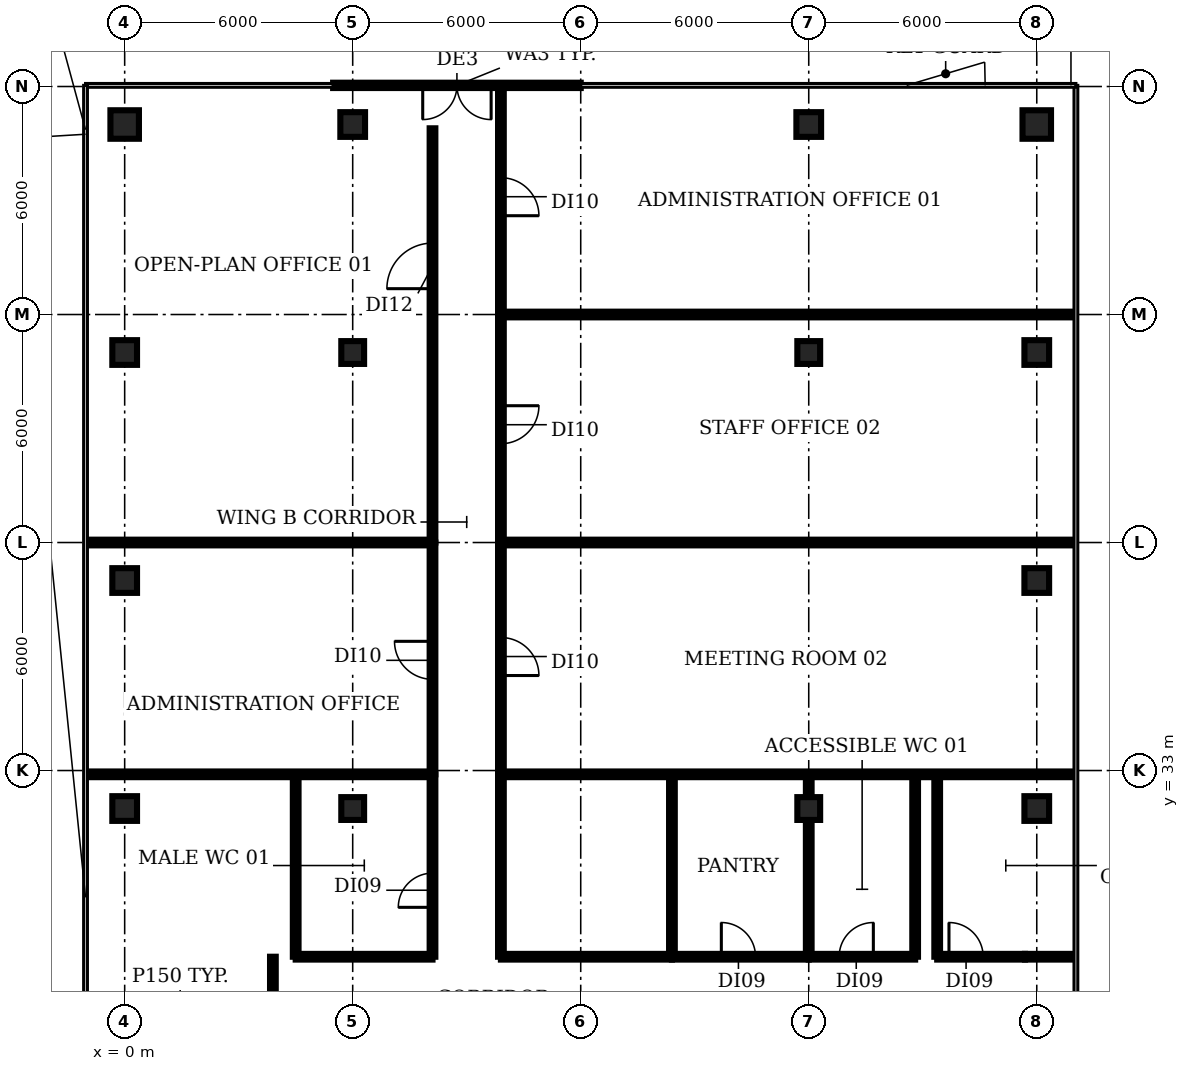
"""IFC4 building model, lengths in metres.
Left out: names, types, materials, properties, quantities, classifications, styles, units other than length and angle.
Written with IfcOpenShell. Run it as: python <this file> out.ifc"""

import sys

from ifc_helpers import new_model, si_unit, direction, frame, frame_2d, origin, origin_2d, place, context, subcontext, project, spatial, rectangle, circle, extrude, element, fill, save


model = new_model("IFC4")
c1 = context("Model", 3, precision=1e-05, world=origin(), true_north=direction((0.0, 1.0)))
c2 = subcontext(c1, "Body", "Model", "MODEL_VIEW")
j1 = project(units=[si_unit("LENGTHUNIT", "METRE"), si_unit("PLANEANGLEUNIT", "RADIAN")], contexts=[c1])
p1 = place(None, origin())
s1 = spatial("IfcSite", under=j1, at=p1, CompositionType="ELEMENT")
p2 = place(p1, origin())
s2 = spatial("IfcBuilding", under=s1, at=p2, CompositionType="ELEMENT")
p3 = place(p2, frame((0.0, 0.0, 314.6)))
s3 = spatial("IfcBuildingStorey", under=s2, at=p3, CompositionType="ELEMENT", Elevation=314.6)
for number, where, z_axis, x_axis in (
    (1, (0.0, 32.0, 0.0), (0.0, 0.0, 1.0), (1.0, 0.0, 0.0)),
    (2, (0.0, 38.0, 0.0), (0.0, 0.0, 1.0), (1.0, 0.0, 0.0)),
    (3, (0.0, 44.0, 0.0), (0.0, 0.0, 1.0), (1.0, 0.0, 0.0)),
):
    element("IfcColumn", number, at=place(p3, frame(where, z_axis=z_axis, x_axis=x_axis)), inside=s3, PredefinedType="COLUMN", context=c2, shape_type="SweptSolid", body=[
        extrude(rectangle(XDim=0.65, YDim=0.65, at=origin_2d()), origin(), (0.0, 0.0, 1.0), 3.9),
    ])
p4 = place(p3, frame((0.0, 50.0, 0.0), z_axis=(0.0, 0.0, 1.0), x_axis=(1.0, 0.0, 0.0)))
e4 = element("IfcColumn", 4, at=p4, inside=s3, PredefinedType="COLUMN", context=c2, shape_type="SweptSolid", body=[
    extrude(circle(Radius=0.375, at=origin_2d()), origin(), (0.0, 0.0, 1.0), 3.9),
])
for number, where, z_axis, x_axis in (
    (5, (6.0, 32.0, 0.0), (0.0, 0.0, 1.0), (1.0, 0.0, 0.0)),
    (6, (6.0, 44.0, 0.0), (0.0, 0.0, 1.0), (1.0, 0.0, 0.0)),
):
    element("IfcColumn", number, at=place(p3, frame(where, z_axis=z_axis, x_axis=x_axis)), inside=s3, PredefinedType="COLUMN", context=c2, shape_type="SweptSolid", body=[
        extrude(rectangle(XDim=0.6, YDim=0.6, at=origin_2d()), origin(), (0.0, 0.0, 1.0), 3.9),
    ])
p5 = place(p3, frame((6.0, 50.0, 0.0), z_axis=(0.0, 0.0, 1.0), x_axis=(1.0, 0.0, 0.0)))
e7 = element("IfcColumn", 7, at=p5, inside=s3, PredefinedType="COLUMN", context=c2, shape_type="SweptSolid", body=[
    extrude(rectangle(XDim=0.65, YDim=0.65, at=origin_2d()), origin(), (0.0, 0.0, 1.0), 3.9),
])
for number, where, z_axis, x_axis in (
    (8, (18.0, 32.0, 0.0), (0.0, 0.0, 1.0), (1.0, 0.0, 0.0)),
    (9, (18.0, 44.0, 0.0), (0.0, 0.0, 1.0), (1.0, 0.0, 0.0)),
):
    element("IfcColumn", number, at=place(p3, frame(where, z_axis=z_axis, x_axis=x_axis)), inside=s3, PredefinedType="COLUMN", context=c2, shape_type="SweptSolid", body=[
        extrude(rectangle(XDim=0.6, YDim=0.6, at=origin_2d()), origin(), (0.0, 0.0, 1.0), 3.9),
    ])
for number, where, z_axis, x_axis in (
    (10, (18.0, 50.0, 0.0), (0.0, 0.0, 1.0), (1.0, 0.0, 0.0)),
    (11, (24.0, 32.0, 0.0), (0.0, 0.0, 1.0), (1.0, 0.0, 0.0)),
    (12, (24.0, 38.0, 0.0), (0.0, 0.0, 1.0), (1.0, 0.0, 0.0)),
    (13, (24.0, 44.0, 0.0), (0.0, 0.0, 1.0), (1.0, 0.0, 0.0)),
):
    element("IfcColumn", number, at=place(p3, frame(where, z_axis=z_axis, x_axis=x_axis)), inside=s3, PredefinedType="COLUMN", context=c2, shape_type="SweptSolid", body=[
        extrude(rectangle(XDim=0.65, YDim=0.65, at=origin_2d()), origin(), (0.0, 0.0, 1.0), 3.9),
    ])
p6 = place(p3, frame((24.0, 50.0, 0.0), z_axis=(0.0, 0.0, 1.0), x_axis=(1.0, 0.0, 0.0)))
e14 = element("IfcColumn", 14, at=p6, inside=s3, PredefinedType="COLUMN", context=c2, shape_type="SweptSolid", body=[
    extrude(circle(Radius=0.375, at=origin_2d()), origin(), (0.0, 0.0, 1.0), 3.9),
])
p7 = place(p3, frame((12.0, 51.03, 0.0), z_axis=(0.0, 0.0, 1.0), x_axis=(-1.0, 0.0, 0.0)))
e15 = element("IfcWall", 15, at=p7, inside=s3, PredefinedType="SOLIDWALL", context=c2, shape_type="SweptSolid", body=[
    extrude(rectangle(XDim=6.515, YDim=0.14, at=frame_2d((3.257, 0.0))), origin(), (0.0, 0.0, 1.0), 3.9),
])
p8 = place(p7, frame((2.357, 0.0, 0.0)))
e16 = element("IfcOpeningElement", 16, at=p8, cuts=e15, PredefinedType="OPENING", context=c2, shape_type="SweptSolid", body=[
    extrude(rectangle(XDim=1.8, YDim=2.4, at=frame_2d((0.9, 1.2))), frame((0.0, 0.08, 0.0), z_axis=(0.0, -1.0, 0.0), x_axis=(1.0, 0.0, 0.0)), (0.0, 0.0, 1.0), 0.16),
])
for number, where, z_axis, x_axis in (
    (17, (-0.98, 32.9, 0.0), (0.0, 0.0, 1.0), (1.0, 0.0, 0.0)),
    (18, (-0.98, 39.0, 0.0), (0.0, 0.0, 1.0), (1.0, 0.0, 0.0)),
):
    element("IfcWall", number, at=place(p3, frame(where, z_axis=z_axis, x_axis=x_axis)), inside=s3, PredefinedType="PARTITIONING", context=c2, shape_type="SweptSolid", body=[
        extrude(rectangle(XDim=9.08, YDim=0.15, at=frame_2d((4.54, 0.0))), origin(), (0.0, 0.0, 1.0), 2.95),
    ])
p9 = place(p3, frame((3.9, 22.5, 0.0), z_axis=(0.0, 0.0, 1.0), x_axis=(0.0, 1.0, 0.0)))
e19 = element("IfcWall", 19, at=p9, inside=s3, PredefinedType="PARTITIONING", context=c2, shape_type="SweptSolid", body=[
    extrude(rectangle(XDim=5.6, YDim=0.15, at=frame_2d((2.8, 0.0))), origin(), (0.0, 0.0, 1.0), 2.95),
])
p10 = place(p3, frame((4.5, 28.1, 0.0), z_axis=(0.0, 0.0, 1.0), x_axis=(0.0, 1.0, 0.0)))
e20 = element("IfcWall", 20, at=p10, inside=s3, PredefinedType="PARTITIONING", context=c2, shape_type="SweptSolid", body=[
    extrude(rectangle(XDim=4.8, YDim=0.15, at=frame_2d((2.4, 0.0))), origin(), (0.0, 0.0, 1.0), 2.95),
])
p11 = place(p3, frame((4.5, 28.1, 0.0), z_axis=(0.0, 0.0, 1.0), x_axis=(1.0, 0.0, 0.0)))
e21 = element("IfcWall", 21, at=p11, inside=s3, PredefinedType="PARTITIONING", context=c2, shape_type="SweptSolid", body=[
    extrude(rectangle(XDim=3.6, YDim=0.15, at=frame_2d((1.8, 0.0))), origin(), (0.0, 0.0, 1.0), 2.95),
])
p12 = place(p3, frame((8.1, 28.1, 0.0), z_axis=(0.0, 0.0, 1.0), x_axis=(0.0, 1.0, 0.0)))
e22 = element("IfcWall", 22, at=p12, inside=s3, PredefinedType="PARTITIONING", context=c2, shape_type="SweptSolid", body=[
    extrude(rectangle(XDim=4.8, YDim=0.15, at=frame_2d((2.4, 0.0))), origin(), (0.0, 0.0, 1.0), 2.95),
])
p13 = place(p12, frame((1.3, 0.0, 0.0)))
e23 = element("IfcOpeningElement", 23, at=p13, cuts=e22, PredefinedType="OPENING", context=c2, shape_type="SweptSolid", body=[
    extrude(rectangle(XDim=0.9, YDim=2.1, at=frame_2d((0.45, 1.05))), frame((0.0, 0.085, 0.0), z_axis=(0.0, -1.0, 0.0), x_axis=(1.0, 0.0, 0.0)), (0.0, 0.0, 1.0), 0.17),
])
p14 = place(p3, frame((8.1, 32.9, 0.0), z_axis=(0.0, 0.0, 1.0), x_axis=(0.0, 1.0, 0.0)))
e24 = element("IfcWall", 24, at=p14, inside=s3, PredefinedType="PARTITIONING", context=c2, shape_type="SweptSolid", body=[
    extrude(rectangle(XDim=6.1, YDim=0.15, at=frame_2d((3.05, 0.0))), origin(), (0.0, 0.0, 1.0), 2.95),
])
p15 = place(p14, frame((2.5, 0.0, 0.0)))
e25 = element("IfcOpeningElement", 25, at=p15, cuts=e24, PredefinedType="OPENING", context=c2, shape_type="SweptSolid", body=[
    extrude(rectangle(XDim=1.0, YDim=2.1, at=frame_2d((0.5, 1.05))), frame((0.0, 0.085, 0.0), z_axis=(0.0, -1.0, 0.0), x_axis=(1.0, 0.0, 0.0)), (0.0, 0.0, 1.0), 0.17),
])
p16 = place(p3, frame((8.1, 39.0, 0.0), z_axis=(0.0, 0.0, 1.0), x_axis=(0.0, 1.0, 0.0)))
e26 = element("IfcWall", 26, at=p16, inside=s3, PredefinedType="PARTITIONING", context=c2, shape_type="SweptSolid", body=[
    extrude(rectangle(XDim=10.9, YDim=0.15, at=frame_2d((5.45, 0.0))), origin(), (0.0, 0.0, 1.0), 2.95),
])
p17 = place(p16, frame((6.68, 0.0, 0.0)))
e27 = element("IfcOpeningElement", 27, at=p17, cuts=e26, PredefinedType="OPENING", context=c2, shape_type="SweptSolid", body=[
    extrude(rectangle(XDim=1.2, YDim=2.1, at=frame_2d((0.6, 1.05))), frame((0.0, 0.085, 0.0), z_axis=(0.0, -1.0, 0.0), x_axis=(1.0, 0.0, 0.0)), (0.0, 0.0, 1.0), 0.17),
])
p18 = place(p3, frame((9.9, 28.1, 0.0), z_axis=(0.0, 0.0, 1.0), x_axis=(0.0, 1.0, 0.0)))
e28 = element("IfcWall", 28, at=p18, inside=s3, PredefinedType="PARTITIONING", context=c2, shape_type="SweptSolid", body=[
    extrude(rectangle(XDim=4.8, YDim=0.15, at=frame_2d((2.4, 0.0))), origin(), (0.0, 0.0, 1.0), 2.95),
])
p19 = place(p3, frame((9.9, 28.1, 0.0), z_axis=(0.0, 0.0, 1.0), x_axis=(1.0, 0.0, 0.0)))
e29 = element("IfcWall", 29, at=p19, inside=s3, PredefinedType="PARTITIONING", context=c2, shape_type="SweptSolid", body=[
    extrude(rectangle(XDim=4.5, YDim=0.15, at=frame_2d((2.25, 0.0))), origin(), (0.0, 0.0, 1.0), 2.95),
])
p20 = place(p3, frame((9.9, 32.9, 0.0), z_axis=(0.0, 0.0, 1.0), x_axis=(1.0, 0.0, 0.0)))
e30 = element("IfcWall", 30, at=p20, inside=s3, PredefinedType="PARTITIONING", context=c2, shape_type="SweptSolid", body=[
    extrude(rectangle(XDim=15.08, YDim=0.15, at=frame_2d((7.54, 0.0))), origin(), (0.0, 0.0, 1.0), 2.95),
])
p21 = place(p3, frame((9.9, 39.0, 0.0), z_axis=(0.0, 0.0, 1.0), x_axis=(0.0, -1.0, 0.0)))
e31 = element("IfcWall", 31, at=p21, inside=s3, PredefinedType="PARTITIONING", context=c2, shape_type="SweptSolid", body=[
    extrude(rectangle(XDim=6.1, YDim=0.15, at=frame_2d((3.05, 0.0))), origin(), (0.0, 0.0, 1.0), 2.95),
])
p22 = place(p21, frame((2.5, 0.0, 0.0)))
e32 = element("IfcOpeningElement", 32, at=p22, cuts=e31, PredefinedType="OPENING", context=c2, shape_type="SweptSolid", body=[
    extrude(rectangle(XDim=1.0, YDim=2.1, at=frame_2d((0.5, 1.05))), frame((0.0, 0.085, 0.0), z_axis=(0.0, -1.0, 0.0), x_axis=(1.0, 0.0, 0.0)), (0.0, 0.0, 1.0), 0.17),
])
p23 = place(p3, frame((9.9, 39.0, 0.0), z_axis=(0.0, 0.0, 1.0), x_axis=(1.0, 0.0, 0.0)))
e33 = element("IfcWall", 33, at=p23, inside=s3, PredefinedType="PARTITIONING", context=c2, shape_type="SweptSolid", body=[
    extrude(rectangle(XDim=15.08, YDim=0.15, at=frame_2d((7.54, 0.0))), origin(), (0.0, 0.0, 1.0), 2.95),
])
p24 = place(p3, frame((9.9, 45.0, 0.0), z_axis=(0.0, 0.0, 1.0), x_axis=(0.0, -1.0, 0.0)))
e34 = element("IfcWall", 34, at=p24, inside=s3, PredefinedType="PARTITIONING", context=c2, shape_type="SweptSolid", body=[
    extrude(rectangle(XDim=6.0, YDim=0.15, at=frame_2d((3.0, 0.0))), origin(), (0.0, 0.0, 1.0), 2.95),
])
p25 = place(p24, frame((2.4, 0.0, 0.0)))
e35 = element("IfcOpeningElement", 35, at=p25, cuts=e34, PredefinedType="OPENING", context=c2, shape_type="SweptSolid", body=[
    extrude(rectangle(XDim=1.0, YDim=2.1, at=frame_2d((0.5, 1.05))), frame((0.0, 0.085, 0.0), z_axis=(0.0, -1.0, 0.0), x_axis=(1.0, 0.0, 0.0)), (0.0, 0.0, 1.0), 0.17),
])
p26 = place(p3, frame((9.9, 45.0, 0.0), z_axis=(0.0, 0.0, 1.0), x_axis=(1.0, 0.0, 0.0)))
e36 = element("IfcWall", 36, at=p26, inside=s3, PredefinedType="PARTITIONING", context=c2, shape_type="SweptSolid", body=[
    extrude(rectangle(XDim=15.075, YDim=0.15, at=frame_2d((7.538, 0.0))), origin(), (0.0, 0.0, 1.0), 2.95),
])
p27 = place(p3, frame((9.9, 50.98, 0.0), z_axis=(0.0, 0.0, 1.0), x_axis=(0.0, -1.0, 0.0)))
e37 = element("IfcWall", 37, at=p27, inside=s3, PredefinedType="PARTITIONING", context=c2, shape_type="SweptSolid", body=[
    extrude(rectangle(XDim=5.98, YDim=0.15, at=frame_2d((2.99, 0.0))), origin(), (0.0, 0.0, 1.0), 2.95),
])
p28 = place(p27, frame((2.38, 0.0, 0.0)))
e38 = element("IfcOpeningElement", 38, at=p28, cuts=e37, PredefinedType="OPENING", context=c2, shape_type="SweptSolid", body=[
    extrude(rectangle(XDim=1.0, YDim=2.1, at=frame_2d((0.5, 1.05))), frame((0.0, 0.085, 0.0), z_axis=(0.0, -1.0, 0.0), x_axis=(1.0, 0.0, 0.0)), (0.0, 0.0, 1.0), 0.17),
])
p29 = place(p3, frame((14.4, 28.1, 0.0), z_axis=(0.0, 0.0, 1.0), x_axis=(0.0, 1.0, 0.0)))
e39 = element("IfcWall", 39, at=p29, inside=s3, PredefinedType="PARTITIONING", context=c2, shape_type="SweptSolid", body=[
    extrude(rectangle(XDim=4.8, YDim=0.15, at=frame_2d((2.4, 0.0))), origin(), (0.0, 0.0, 1.0), 2.95),
])
p30 = place(p3, frame((14.4, 28.1, 0.0), z_axis=(0.0, 0.0, 1.0), x_axis=(1.0, 0.0, 0.0)))
e40 = element("IfcWall", 40, at=p30, inside=s3, PredefinedType="PARTITIONING", context=c2, shape_type="SweptSolid", body=[
    extrude(rectangle(XDim=3.6, YDim=0.15, at=frame_2d((1.8, 0.0))), origin(), (0.0, 0.0, 1.0), 2.95),
])
p31 = place(p30, frame((1.3, 0.0, 0.0)))
e41 = element("IfcOpeningElement", 41, at=p31, cuts=e40, PredefinedType="OPENING", context=c2, shape_type="SweptSolid", body=[
    extrude(rectangle(XDim=0.9, YDim=2.1, at=frame_2d((0.45, 1.05))), frame((0.0, 0.085, 0.0), z_axis=(0.0, -1.0, 0.0), x_axis=(1.0, 0.0, 0.0)), (0.0, 0.0, 1.0), 0.17),
])
p32 = place(p3, frame((18.0, 28.1, 0.0), z_axis=(0.0, 0.0, 1.0), x_axis=(0.0, 1.0, 0.0)))
e42 = element("IfcWall", 42, at=p32, inside=s3, PredefinedType="PARTITIONING", context=c2, shape_type="SweptSolid", body=[
    extrude(rectangle(XDim=3.53, YDim=0.15, at=frame_2d((1.765, 0.0))), origin(), (0.0, 0.0, 1.0), 2.95),
])
p33 = place(p3, frame((18.0, 28.1, 0.0), z_axis=(0.0, 0.0, 1.0), x_axis=(1.0, 0.0, 0.0)))
e43 = element("IfcWall", 43, at=p33, inside=s3, PredefinedType="PARTITIONING", context=c2, shape_type="SweptSolid", body=[
    extrude(rectangle(XDim=2.8, YDim=0.15, at=frame_2d((1.4, 0.0))), origin(), (0.0, 0.0, 1.0), 2.95),
])
p34 = place(p33, frame((0.8, 0.0, 0.0)))
e44 = element("IfcOpeningElement", 44, at=p34, cuts=e43, PredefinedType="OPENING", context=c2, shape_type="SweptSolid", body=[
    extrude(rectangle(XDim=0.9, YDim=2.1, at=frame_2d((0.45, 1.05))), frame((0.0, 0.085, 0.0), z_axis=(0.0, -1.0, 0.0), x_axis=(1.0, 0.0, 0.0)), (0.0, 0.0, 1.0), 0.17),
])
p35 = place(p3, frame((18.0, 31.736, 0.0), z_axis=(0.0, 0.0, 1.0), x_axis=(0.0, 1.0, 0.0)))
e45 = element("IfcWall", 45, at=p35, inside=s3, PredefinedType="PARTITIONING", context=c2, shape_type="SweptSolid", body=[
    extrude(rectangle(XDim=0.529, YDim=0.15, at=frame_2d((0.264, 0.0))), origin(), (0.0, 0.0, 1.0), 2.95),
])
p36 = place(p3, frame((18.0, 32.37, 0.0), z_axis=(0.0, 0.0, 1.0), x_axis=(0.0, 1.0, 0.0)))
e46 = element("IfcWall", 46, at=p36, inside=s3, PredefinedType="PARTITIONING", context=c2, shape_type="SweptSolid", body=[
    extrude(rectangle(XDim=0.53, YDim=0.15, at=frame_2d((0.265, 0.0))), origin(), (0.0, 0.0, 1.0), 2.95),
])
for number, where, z_axis, x_axis in (
    (47, (20.8, 28.1, 0.0), (0.0, 0.0, 1.0), (0.0, 1.0, 0.0)),
    (48, (21.38, 28.1, 0.0), (0.0, 0.0, 1.0), (0.0, 1.0, 0.0)),
):
    element("IfcWall", number, at=place(p3, frame(where, z_axis=z_axis, x_axis=x_axis)), inside=s3, PredefinedType="PARTITIONING", context=c2, shape_type="SweptSolid", body=[
        extrude(rectangle(XDim=4.8, YDim=0.15, at=frame_2d((2.4, 0.0))), origin(), (0.0, 0.0, 1.0), 2.95),
    ])
p37 = place(p3, frame((21.38, 28.1, 0.0), z_axis=(0.0, 0.0, 1.0), x_axis=(1.0, 0.0, 0.0)))
e49 = element("IfcWall", 49, at=p37, inside=s3, PredefinedType="PARTITIONING", context=c2, shape_type="SweptSolid", body=[
    extrude(rectangle(XDim=2.31, YDim=0.15, at=frame_2d((1.155, 0.0))), origin(), (0.0, 0.0, 1.0), 2.95),
])
p38 = place(p37, frame((0.31, 0.0, 0.0)))
e50 = element("IfcOpeningElement", 50, at=p38, cuts=e49, PredefinedType="OPENING", context=c2, shape_type="SweptSolid", body=[
    extrude(rectangle(XDim=0.9, YDim=2.1, at=frame_2d((0.45, 1.05))), frame((0.0, 0.085, 0.0), z_axis=(0.0, -1.0, 0.0), x_axis=(1.0, 0.0, 0.0)), (0.0, 0.0, 1.0), 0.17),
])
p39 = place(p3, frame((23.69, 28.1, 0.0), z_axis=(0.0, 0.0, 1.0), x_axis=(1.0, 0.0, 0.0)))
e51 = element("IfcWall", 51, at=p39, inside=s3, PredefinedType="PARTITIONING", context=c2, shape_type="SweptSolid", body=[
    extrude(rectangle(XDim=1.29, YDim=0.15, at=frame_2d((0.645, 0.0))), origin(), (0.0, 0.0, 1.0), 2.95),
])
p40 = place(p8, origin())
e52 = element("IfcDoor", 52, at=p40, inside=s3, OperationType="DOUBLE_DOOR_DOUBLE_SWING", PredefinedType="DOOR", context=c2, shape_type="SweptSolid", body=[
    extrude(rectangle(XDim=1.8, YDim=2.4, at=frame_2d((0.9, 1.2))), frame((0.0, 0.025, 0.0), z_axis=(0.0, -1.0, 0.0), x_axis=(1.0, 0.0, 0.0)), (0.0, 0.0, 1.0), 0.05),
])
fill(e16, e52)
p41 = place(p13, origin())
e53 = element("IfcDoor", 53, at=p41, inside=s3, OperationType="SINGLE_SWING_LEFT", PredefinedType="DOOR", context=c2, shape_type="SweptSolid", body=[
    extrude(rectangle(XDim=0.9, YDim=2.1, at=frame_2d((0.45, 1.05))), frame((0.0, 0.025, 0.0), z_axis=(0.0, -1.0, 0.0), x_axis=(1.0, 0.0, 0.0)), (0.0, 0.0, 1.0), 0.05),
])
fill(e23, e53)
p42 = place(p15, origin())
e54 = element("IfcDoor", 54, at=p42, inside=s3, OperationType="SINGLE_SWING_RIGHT", PredefinedType="DOOR", context=c2, shape_type="SweptSolid", body=[
    extrude(rectangle(XDim=1.0, YDim=2.1, at=frame_2d((0.5, 1.05))), frame((0.0, 0.025, 0.0), z_axis=(0.0, -1.0, 0.0), x_axis=(1.0, 0.0, 0.0)), (0.0, 0.0, 1.0), 0.05),
])
fill(e25, e54)
p43 = place(p17, origin())
e55 = element("IfcDoor", 55, at=p43, inside=s3, OperationType="SINGLE_SWING_LEFT", PredefinedType="DOOR", context=c2, shape_type="SweptSolid", body=[
    extrude(rectangle(XDim=1.2, YDim=2.1, at=frame_2d((0.6, 1.05))), frame((0.0, 0.025, 0.0), z_axis=(0.0, -1.0, 0.0), x_axis=(1.0, 0.0, 0.0)), (0.0, 0.0, 1.0), 0.05),
])
fill(e27, e55)
p44 = place(p22, origin())
e56 = element("IfcDoor", 56, at=p44, inside=s3, OperationType="SINGLE_SWING_RIGHT", PredefinedType="DOOR", context=c2, shape_type="SweptSolid", body=[
    extrude(rectangle(XDim=1.0, YDim=2.1, at=frame_2d((0.5, 1.05))), frame((0.0, 0.025, 0.0), z_axis=(0.0, -1.0, 0.0), x_axis=(1.0, 0.0, 0.0)), (0.0, 0.0, 1.0), 0.05),
])
fill(e32, e56)
p45 = place(p25, origin())
e57 = element("IfcDoor", 57, at=p45, inside=s3, OperationType="SINGLE_SWING_LEFT", PredefinedType="DOOR", context=c2, shape_type="SweptSolid", body=[
    extrude(rectangle(XDim=1.0, YDim=2.1, at=frame_2d((0.5, 1.05))), frame((0.0, 0.025, 0.0), z_axis=(0.0, -1.0, 0.0), x_axis=(1.0, 0.0, 0.0)), (0.0, 0.0, 1.0), 0.05),
])
fill(e35, e57)
p46 = place(p28, origin())
e58 = element("IfcDoor", 58, at=p46, inside=s3, OperationType="SINGLE_SWING_RIGHT", PredefinedType="DOOR", context=c2, shape_type="SweptSolid", body=[
    extrude(rectangle(XDim=1.0, YDim=2.1, at=frame_2d((0.5, 1.05))), frame((0.0, 0.025, 0.0), z_axis=(0.0, -1.0, 0.0), x_axis=(1.0, 0.0, 0.0)), (0.0, 0.0, 1.0), 0.05),
])
fill(e38, e58)
p47 = place(p31, origin())
e59 = element("IfcDoor", 59, at=p47, inside=s3, OperationType="SINGLE_SWING_LEFT", PredefinedType="DOOR", context=c2, shape_type="SweptSolid", body=[
    extrude(rectangle(XDim=0.9, YDim=2.1, at=frame_2d((0.45, 1.05))), frame((0.0, 0.025, 0.0), z_axis=(0.0, -1.0, 0.0), x_axis=(1.0, 0.0, 0.0)), (0.0, 0.0, 1.0), 0.05),
])
fill(e41, e59)
p48 = place(p34, origin())
e60 = element("IfcDoor", 60, at=p48, inside=s3, OperationType="SINGLE_SWING_RIGHT", PredefinedType="DOOR", context=c2, shape_type="SweptSolid", body=[
    extrude(rectangle(XDim=0.9, YDim=2.1, at=frame_2d((0.45, 1.05))), frame((0.0, 0.025, 0.0), z_axis=(0.0, -1.0, 0.0), x_axis=(1.0, 0.0, 0.0)), (0.0, 0.0, 1.0), 0.05),
])
fill(e44, e60)
p49 = place(p38, origin())
e61 = element("IfcDoor", 61, at=p49, inside=s3, OperationType="SINGLE_SWING_LEFT", PredefinedType="DOOR", context=c2, shape_type="SweptSolid", body=[
    extrude(rectangle(XDim=0.9, YDim=2.1, at=frame_2d((0.45, 1.05))), frame((0.0, 0.025, 0.0), z_axis=(0.0, -1.0, 0.0), x_axis=(1.0, 0.0, 0.0)), (0.0, 0.0, 1.0), 0.05),
])
fill(e50, e61)
save(model, sys.argv[1])
